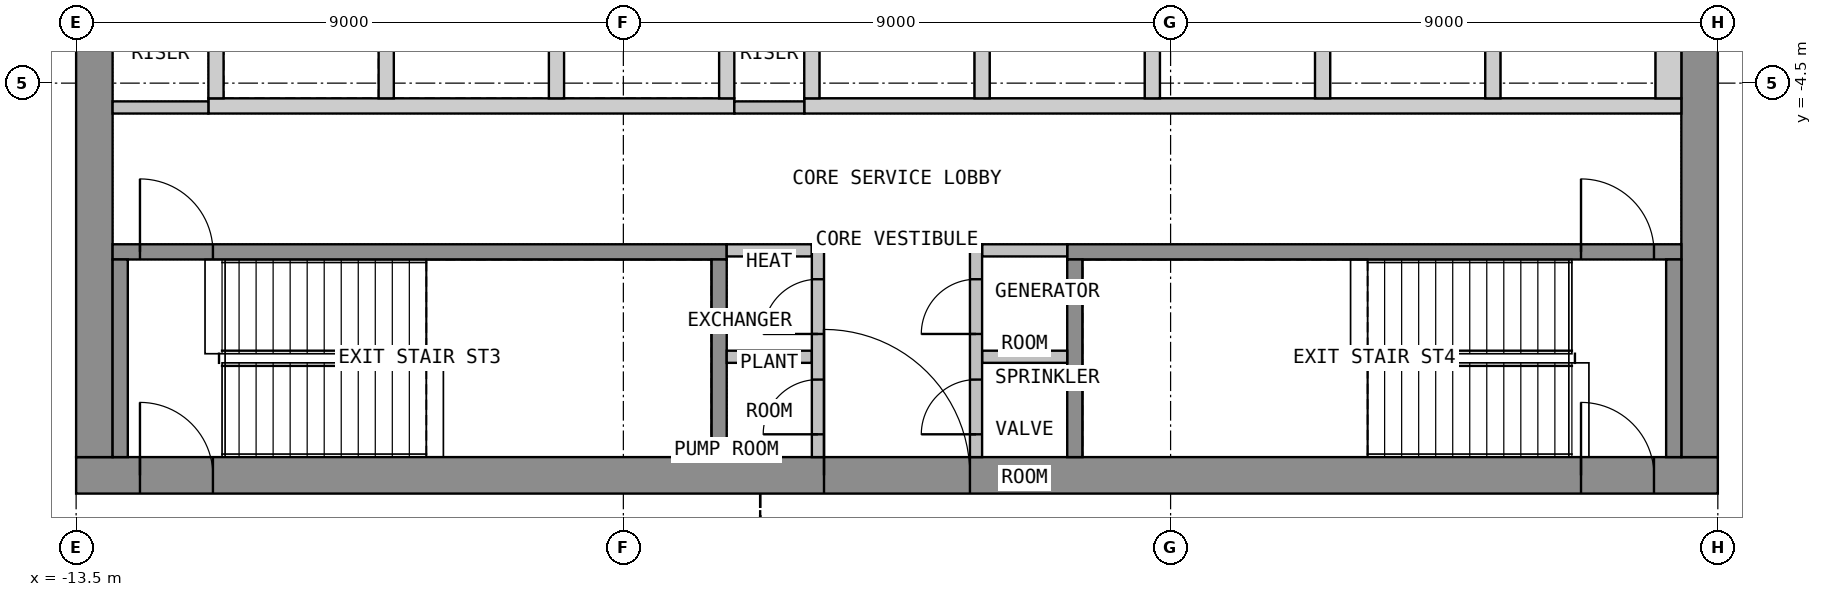
"""IFC4 building model, lengths in metres.
Left out: names, types, materials, properties, quantities, classifications, styles, units other than length and angle.
Written with IfcOpenShell. Run it as: python <this file> out.ifc"""

import sys

from ifc_helpers import new_model, si_unit, direction, frame, frame_2d, origin, place, context, subcontext, project, spatial, polyline, rectangle, outline, extrude, element, fill, save


model = new_model("IFC4")
c1 = context("Model", 3, precision=1e-05, world=origin(), true_north=direction((0.0, 1.0)))
c2 = subcontext(c1, "Body", "Model", "MODEL_VIEW")
j1 = project(units=[si_unit("LENGTHUNIT", "METRE"), si_unit("PLANEANGLEUNIT", "RADIAN")], contexts=[c1])
p1 = place(None, origin())
s1 = spatial("IfcSite", under=j1, at=p1, CompositionType="ELEMENT")
p2 = place(p1, origin())
s2 = spatial("IfcBuilding", under=s1, at=p2, CompositionType="ELEMENT")
p3 = place(p2, frame((0.0, 0.0, 230.7)))
s3 = spatial("IfcBuildingStorey", under=s2, at=p3, CompositionType="ELEMENT", Elevation=230.7)
p4 = place(p3, frame((-13.5, -10.95, 0.0), z_axis=(0.0, 0.0, 1.0), x_axis=(1.0, 0.0, 0.0)))
e1 = element("IfcWall", 1, at=p4, inside=s3, PredefinedType="SHEAR", context=c2, shape_type="SweptSolid", body=[
    extrude(rectangle(XDim=27.0, YDim=0.6, at=frame_2d((13.5, 0.0))), origin(), (0.0, 0.0, 1.0), 4.175),
])
p5 = place(p4, frame((12.3, 0.0, 0.0)))
e2 = element("IfcOpeningElement", 2, at=p5, cuts=e1, PredefinedType="OPENING", context=c2, shape_type="SweptSolid", body=[
    extrude(rectangle(XDim=2.4, YDim=2.1, at=frame_2d((1.2, 1.05))), frame((0.0, 0.31, 0.0), z_axis=(0.0, -1.0, 0.0), x_axis=(1.0, 0.0, 0.0)), (0.0, 0.0, 1.0), 0.62),
])
p6 = place(p4, frame((1.05, 0.0, 0.0)))
e3 = element("IfcOpeningElement", 3, at=p6, cuts=e1, PredefinedType="OPENING", context=c2, shape_type="SweptSolid", body=[
    extrude(rectangle(XDim=1.2, YDim=2.1, at=frame_2d((0.6, 1.05))), frame((0.0, 0.31, 0.0), z_axis=(0.0, -1.0, 0.0), x_axis=(1.0, 0.0, 0.0)), (0.0, 0.0, 1.0), 0.62),
])
p7 = place(p4, frame((24.75, 0.0, 0.0)))
e4 = element("IfcOpeningElement", 4, at=p7, cuts=e1, PredefinedType="OPENING", context=c2, shape_type="SweptSolid", body=[
    extrude(rectangle(XDim=1.2, YDim=2.1, at=frame_2d((0.6, 1.05))), frame((0.0, 0.31, 0.0), z_axis=(0.0, -1.0, 0.0), x_axis=(1.0, 0.0, 0.0)), (0.0, 0.0, 1.0), 0.62),
])
p8 = place(p3, frame((-13.2, -10.65, 0.0), z_axis=(0.0, 0.0, 1.0), x_axis=(0.0, 1.0, 0.0)))
e5 = element("IfcWall", 5, at=p8, inside=s3, PredefinedType="SHEAR", context=c2, shape_type="SweptSolid", body=[
    extrude(rectangle(XDim=21.3, YDim=0.6, at=frame_2d((10.65, 0.0))), origin(), (0.0, 0.0, 1.0), 4.175),
])
p9 = place(p8, frame((9.45, 0.0, 0.0)))
e6 = element("IfcOpeningElement", 6, at=p9, cuts=e5, PredefinedType="OPENING", context=c2, shape_type="SweptSolid", body=[
    extrude(rectangle(XDim=2.4, YDim=2.1, at=frame_2d((1.2, 1.05))), frame((0.0, 0.31, 0.0), z_axis=(0.0, -1.0, 0.0), x_axis=(1.0, 0.0, 0.0)), (0.0, 0.0, 1.0), 0.62),
])
p10 = place(p3, frame((13.2, -10.65, 0.0), z_axis=(0.0, 0.0, 1.0), x_axis=(0.0, 1.0, 0.0)))
e7 = element("IfcWall", 7, at=p10, inside=s3, PredefinedType="SHEAR", context=c2, shape_type="SweptSolid", body=[
    extrude(rectangle(XDim=21.3, YDim=0.6, at=frame_2d((10.65, 0.0))), origin(), (0.0, 0.0, 1.0), 4.175),
])
p11 = place(p10, frame((9.45, 0.0, 0.0)))
e8 = element("IfcOpeningElement", 8, at=p11, cuts=e7, PredefinedType="OPENING", context=c2, shape_type="SweptSolid", body=[
    extrude(rectangle(XDim=2.4, YDim=2.1, at=frame_2d((1.2, 1.05))), frame((0.0, 0.31, 0.0), z_axis=(0.0, -1.0, 0.0), x_axis=(1.0, 0.0, 0.0)), (0.0, 0.0, 1.0), 0.62),
])
p12 = place(p3, origin())
e9 = element("IfcWall", 9, at=p12, inside=s3, PredefinedType="SHEAR", context=c2, shape_type="SweptSolid", body=[
    extrude(outline(polyline([(-11.325, -5.0), (-2.675, -5.0), (-2.675, -4.75), (-11.325, -4.75), (-11.325, -5.0)])), origin(), (0.0, 0.0, 1.0), 4.175),
])
p13 = place(p3, origin())
e10 = element("IfcWall", 10, at=p13, inside=s3, PredefinedType="SHEAR", context=c2, shape_type="SweptSolid", body=[
    extrude(outline(polyline([(-1.525, -5.0), (12.9, -5.0), (12.9, -4.75), (-1.525, -4.75), (-1.525, -5.0)])), origin(), (0.0, 0.0, 1.0), 4.175),
])
p14 = place(p3, origin())
e11 = element("IfcWall", 11, at=p14, inside=s3, PredefinedType="SHEAR", context=c2, shape_type="SweptSolid", body=[
    extrude(outline(polyline([(-11.325, -4.75), (-11.075, -4.75), (-11.075, -2.05), (-11.325, -2.05), (-11.325, -4.75)])), origin(), (0.0, 0.0, 1.0), 4.175),
])
p15 = place(p3, origin())
e12 = element("IfcWall", 12, at=p15, inside=s3, PredefinedType="SHEAR", context=c2, shape_type="SweptSolid", body=[
    extrude(outline(polyline([(-8.525, -4.75), (-8.275, -4.75), (-8.275, -2.05), (-8.525, -2.05), (-8.525, -4.75)])), origin(), (0.0, 0.0, 1.0), 4.175),
])
p16 = place(p3, origin())
e13 = element("IfcWall", 13, at=p16, inside=s3, PredefinedType="SHEAR", context=c2, shape_type="SweptSolid", body=[
    extrude(outline(polyline([(-5.725, -4.75), (-5.475, -4.75), (-5.475, -2.05), (-5.725, -2.05), (-5.725, -4.75)])), origin(), (0.0, 0.0, 1.0), 4.175),
])
p17 = place(p3, origin())
e14 = element("IfcWall", 14, at=p17, inside=s3, PredefinedType="SHEAR", context=c2, shape_type="SweptSolid", body=[
    extrude(outline(polyline([(-2.925, -4.75), (-2.675, -4.75), (-2.675, -2.05), (-2.925, -2.05), (-2.925, -4.75)])), origin(), (0.0, 0.0, 1.0), 4.175),
])
p18 = place(p3, origin())
e15 = element("IfcWall", 15, at=p18, inside=s3, PredefinedType="SHEAR", context=c2, shape_type="SweptSolid", body=[
    extrude(outline(polyline([(-1.525, -4.75), (-1.275, -4.75), (-1.275, -2.05), (-1.525, -2.05), (-1.525, -4.75)])), origin(), (0.0, 0.0, 1.0), 4.175),
])
p19 = place(p3, origin())
e16 = element("IfcWall", 16, at=p19, inside=s3, PredefinedType="SHEAR", context=c2, shape_type="SweptSolid", body=[
    extrude(outline(polyline([(1.275, -4.75), (1.525, -4.75), (1.525, -2.05), (1.275, -2.05), (1.275, -4.75)])), origin(), (0.0, 0.0, 1.0), 4.175),
])
p20 = place(p3, origin())
e17 = element("IfcWall", 17, at=p20, inside=s3, PredefinedType="SHEAR", context=c2, shape_type="SweptSolid", body=[
    extrude(outline(polyline([(4.075, -4.75), (4.325, -4.75), (4.325, -2.05), (4.075, -2.05), (4.075, -4.75)])), origin(), (0.0, 0.0, 1.0), 4.175),
])
p21 = place(p3, origin())
e18 = element("IfcWall", 18, at=p21, inside=s3, PredefinedType="SHEAR", context=c2, shape_type="SweptSolid", body=[
    extrude(outline(polyline([(6.875, -4.75), (7.125, -4.75), (7.125, -2.05), (6.875, -2.05), (6.875, -4.75)])), origin(), (0.0, 0.0, 1.0), 4.175),
])
p22 = place(p3, origin())
e19 = element("IfcWall", 19, at=p22, inside=s3, PredefinedType="SHEAR", context=c2, shape_type="SweptSolid", body=[
    extrude(outline(polyline([(9.675, -4.75), (9.925, -4.75), (9.925, -2.05), (9.675, -2.05), (9.675, -4.75)])), origin(), (0.0, 0.0, 1.0), 4.175),
])
p23 = place(p3, origin())
e20 = element("IfcWall", 20, at=p23, inside=s3, PredefinedType="SHEAR", context=c2, shape_type="SweptSolid", body=[
    extrude(outline(polyline([(12.475, -4.75), (12.9, -4.75), (12.9, -2.05), (12.475, -2.05), (12.475, -4.75)])), origin(), (0.0, 0.0, 1.0), 4.175),
])
p24 = place(p3, frame((-12.9, -7.275, 0.0), z_axis=(0.0, 0.0, 1.0), x_axis=(1.0, 0.0, 0.0)))
e21 = element("IfcWall", 21, at=p24, inside=s3, PredefinedType="SHEAR", context=c2, shape_type="SweptSolid", body=[
    extrude(rectangle(XDim=10.1, YDim=0.25, at=frame_2d((5.05, 0.0))), origin(), (0.0, 0.0, 1.0), 4.175),
])
p25 = place(p24, frame((0.45, 0.0, 0.0)))
e22 = element("IfcOpeningElement", 22, at=p25, cuts=e21, PredefinedType="OPENING", context=c2, shape_type="SweptSolid", body=[
    extrude(rectangle(XDim=1.2, YDim=2.1, at=frame_2d((0.6, 1.05))), frame((0.0, 0.135, 0.0), z_axis=(0.0, -1.0, 0.0), x_axis=(1.0, 0.0, 0.0)), (0.0, 0.0, 1.0), 0.27),
])
for number, where, z_axis, x_axis in (
    (23, (-12.775, -10.65, 0.0), (0.0, 0.0, 1.0), (0.0, 1.0, 0.0)),
    (24, (-2.925, -10.65, 0.0), (0.0, 0.0, 1.0), (0.0, 1.0, 0.0)),
):
    element("IfcWall", number, at=place(p3, frame(where, z_axis=z_axis, x_axis=x_axis)), inside=s3, PredefinedType="SHEAR", context=c2, shape_type="SweptSolid", body=[
        extrude(rectangle(XDim=3.25, YDim=0.25, at=frame_2d((1.625, 0.0))), origin(), (0.0, 0.0, 1.0), 4.175),
    ])
p26 = place(p3, frame((2.8, -7.275, 0.0), z_axis=(0.0, 0.0, 1.0), x_axis=(1.0, 0.0, 0.0)))
e25 = element("IfcWall", 25, at=p26, inside=s3, PredefinedType="SHEAR", context=c2, shape_type="SweptSolid", body=[
    extrude(rectangle(XDim=10.1, YDim=0.25, at=frame_2d((5.05, 0.0))), origin(), (0.0, 0.0, 1.0), 4.175),
])
p27 = place(p26, frame((8.45, 0.0, 0.0)))
e26 = element("IfcOpeningElement", 26, at=p27, cuts=e25, PredefinedType="OPENING", context=c2, shape_type="SweptSolid", body=[
    extrude(rectangle(XDim=1.2, YDim=2.1, at=frame_2d((0.6, 1.05))), frame((0.0, 0.135, 0.0), z_axis=(0.0, -1.0, 0.0), x_axis=(1.0, 0.0, 0.0)), (0.0, 0.0, 1.0), 0.27),
])
for number, where, z_axis, x_axis in (
    (27, (2.925, -10.65, 0.0), (0.0, 0.0, 1.0), (0.0, 1.0, 0.0)),
    (28, (12.775, -10.65, 0.0), (0.0, 0.0, 1.0), (0.0, 1.0, 0.0)),
):
    element("IfcWall", number, at=place(p3, frame(where, z_axis=z_axis, x_axis=x_axis)), inside=s3, PredefinedType="SHEAR", context=c2, shape_type="SweptSolid", body=[
        extrude(rectangle(XDim=3.25, YDim=0.25, at=frame_2d((1.625, 0.0))), origin(), (0.0, 0.0, 1.0), 4.175),
    ])
for number, where, z_axis, x_axis in (
    (29, (-2.8, -7.25, 0.0), (0.0, 0.0, 1.0), (1.0, 0.0, 0.0)),
    (30, (-2.8, -9.0, 0.0), (0.0, 0.0, 1.0), (1.0, 0.0, 0.0)),
    (31, (1.4, -7.25, 0.0), (0.0, 0.0, 1.0), (1.0, 0.0, 0.0)),
    (32, (1.4, -9.0, 0.0), (0.0, 0.0, 1.0), (1.0, 0.0, 0.0)),
):
    element("IfcWall", number, at=place(p3, frame(where, z_axis=z_axis, x_axis=x_axis)), inside=s3, PredefinedType="PARTITIONING", context=c2, shape_type="SweptSolid", body=[
        extrude(rectangle(XDim=1.4, YDim=0.2, at=frame_2d((0.7, 0.0))), origin(), (0.0, 0.0, 1.0), 4.175),
    ])
p28 = place(p3, frame((-1.3, -10.65, 0.0), z_axis=(0.0, 0.0, 1.0), x_axis=(0.0, 1.0, 0.0)))
e33 = element("IfcWall", 33, at=p28, inside=s3, PredefinedType="PARTITIONING", context=c2, shape_type="SweptSolid", body=[
    extrude(rectangle(XDim=3.5, YDim=0.2, at=frame_2d((1.75, 0.0))), origin(), (0.0, 0.0, 1.0), 4.175),
])
p29 = place(p28, frame((0.375, 0.0, 0.0)))
e34 = element("IfcOpeningElement", 34, at=p29, cuts=e33, PredefinedType="OPENING", context=c2, shape_type="SweptSolid", body=[
    extrude(rectangle(XDim=0.9, YDim=2.1, at=frame_2d((0.45, 1.05))), frame((0.0, 0.11, 0.0), z_axis=(0.0, -1.0, 0.0), x_axis=(1.0, 0.0, 0.0)), (0.0, 0.0, 1.0), 0.22),
])
p30 = place(p28, frame((2.025, 0.0, 0.0)))
e35 = element("IfcOpeningElement", 35, at=p30, cuts=e33, PredefinedType="OPENING", context=c2, shape_type="SweptSolid", body=[
    extrude(rectangle(XDim=0.9, YDim=2.1, at=frame_2d((0.45, 1.05))), frame((0.0, 0.11, 0.0), z_axis=(0.0, -1.0, 0.0), x_axis=(1.0, 0.0, 0.0)), (0.0, 0.0, 1.0), 0.22),
])
p31 = place(p3, frame((1.3, -10.65, 0.0), z_axis=(0.0, 0.0, 1.0), x_axis=(0.0, 1.0, 0.0)))
e36 = element("IfcWall", 36, at=p31, inside=s3, PredefinedType="PARTITIONING", context=c2, shape_type="SweptSolid", body=[
    extrude(rectangle(XDim=3.5, YDim=0.2, at=frame_2d((1.75, 0.0))), origin(), (0.0, 0.0, 1.0), 4.175),
])
p32 = place(p31, frame((0.375, 0.0, 0.0)))
e37 = element("IfcOpeningElement", 37, at=p32, cuts=e36, PredefinedType="OPENING", context=c2, shape_type="SweptSolid", body=[
    extrude(rectangle(XDim=0.9, YDim=2.1, at=frame_2d((0.45, 1.05))), frame((0.0, 0.11, 0.0), z_axis=(0.0, -1.0, 0.0), x_axis=(1.0, 0.0, 0.0)), (0.0, 0.0, 1.0), 0.22),
])
p33 = place(p31, frame((2.025, 0.0, 0.0)))
e38 = element("IfcOpeningElement", 38, at=p33, cuts=e36, PredefinedType="OPENING", context=c2, shape_type="SweptSolid", body=[
    extrude(rectangle(XDim=0.9, YDim=2.1, at=frame_2d((0.45, 1.05))), frame((0.0, 0.11, 0.0), z_axis=(0.0, -1.0, 0.0), x_axis=(1.0, 0.0, 0.0)), (0.0, 0.0, 1.0), 0.22),
])
p34 = place(p3, frame((-12.9, -4.9, 0.0), z_axis=(0.0, 0.0, 1.0), x_axis=(1.0, 0.0, 0.0)))
e39 = element("IfcWall", 39, at=p34, inside=s3, PredefinedType="PARTITIONING", context=c2, shape_type="SweptSolid", body=[
    extrude(rectangle(XDim=1.575, YDim=0.2, at=frame_2d((0.788, 0.0))), origin(), (0.0, 0.0, 1.0), 4.175),
])
p35 = place(p3, frame((-2.675, -4.9, 0.0), z_axis=(0.0, 0.0, 1.0), x_axis=(1.0, 0.0, 0.0)))
e40 = element("IfcWall", 40, at=p35, inside=s3, PredefinedType="PARTITIONING", context=c2, shape_type="SweptSolid", body=[
    extrude(rectangle(XDim=1.15, YDim=0.2, at=frame_2d((0.575, 0.0))), origin(), (0.0, 0.0, 1.0), 4.175),
])
p36 = place(p5, origin())
e41 = element("IfcDoor", 41, at=p36, inside=s3, OperationType="DOUBLE_DOOR_DOUBLE_SWING", PredefinedType="DOOR", context=c2, shape_type="SweptSolid", body=[
    extrude(rectangle(XDim=2.4, YDim=2.1, at=frame_2d((1.2, 1.05))), frame((0.0, 0.025, 0.0), z_axis=(0.0, -1.0, 0.0), x_axis=(1.0, 0.0, 0.0)), (0.0, 0.0, 1.0), 0.05),
])
fill(e2, e41)
p37 = place(p6, origin())
e42 = element("IfcDoor", 42, at=p37, inside=s3, OperationType="SINGLE_SWING_RIGHT", PredefinedType="DOOR", context=c2, shape_type="SweptSolid", body=[
    extrude(rectangle(XDim=1.2, YDim=2.1, at=frame_2d((0.6, 1.05))), frame((0.0, 0.025, 0.0), z_axis=(0.0, -1.0, 0.0), x_axis=(1.0, 0.0, 0.0)), (0.0, 0.0, 1.0), 0.05),
])
fill(e3, e42)
p38 = place(p7, origin())
e43 = element("IfcDoor", 43, at=p38, inside=s3, OperationType="SINGLE_SWING_RIGHT", PredefinedType="DOOR", context=c2, shape_type="SweptSolid", body=[
    extrude(rectangle(XDim=1.2, YDim=2.1, at=frame_2d((0.6, 1.05))), frame((0.0, 0.025, 0.0), z_axis=(0.0, -1.0, 0.0), x_axis=(1.0, 0.0, 0.0)), (0.0, 0.0, 1.0), 0.05),
])
fill(e4, e43)
p39 = place(p25, origin())
e44 = element("IfcDoor", 44, at=p39, inside=s3, OperationType="SINGLE_SWING_LEFT", PredefinedType="DOOR", context=c2, shape_type="SweptSolid", body=[
    extrude(rectangle(XDim=1.2, YDim=2.1, at=frame_2d((0.6, 1.05))), frame((0.0, 0.025, 0.0), z_axis=(0.0, -1.0, 0.0), x_axis=(1.0, 0.0, 0.0)), (0.0, 0.0, 1.0), 0.05),
])
fill(e22, e44)
p40 = place(p27, origin())
e45 = element("IfcDoor", 45, at=p40, inside=s3, OperationType="SINGLE_SWING_LEFT", PredefinedType="DOOR", context=c2, shape_type="SweptSolid", body=[
    extrude(rectangle(XDim=1.2, YDim=2.1, at=frame_2d((0.6, 1.05))), frame((0.0, 0.025, 0.0), z_axis=(0.0, -1.0, 0.0), x_axis=(1.0, 0.0, 0.0)), (0.0, 0.0, 1.0), 0.05),
])
fill(e26, e45)
p41 = place(p29, origin())
e46 = element("IfcDoor", 46, at=p41, inside=s3, OperationType="SINGLE_SWING_LEFT", PredefinedType="DOOR", context=c2, shape_type="SweptSolid", body=[
    extrude(rectangle(XDim=0.9, YDim=2.1, at=frame_2d((0.45, 1.05))), frame((0.0, 0.025, 0.0), z_axis=(0.0, -1.0, 0.0), x_axis=(1.0, 0.0, 0.0)), (0.0, 0.0, 1.0), 0.05),
])
fill(e34, e46)
p42 = place(p30, origin())
e47 = element("IfcDoor", 47, at=p42, inside=s3, OperationType="SINGLE_SWING_LEFT", PredefinedType="DOOR", context=c2, shape_type="SweptSolid", body=[
    extrude(rectangle(XDim=0.9, YDim=2.1, at=frame_2d((0.45, 1.05))), frame((0.0, 0.025, 0.0), z_axis=(0.0, -1.0, 0.0), x_axis=(1.0, 0.0, 0.0)), (0.0, 0.0, 1.0), 0.05),
])
fill(e35, e47)
p43 = place(p32, origin())
e48 = element("IfcDoor", 48, at=p43, inside=s3, OperationType="SINGLE_SWING_LEFT", PredefinedType="DOOR", context=c2, shape_type="SweptSolid", body=[
    extrude(rectangle(XDim=0.9, YDim=2.1, at=frame_2d((0.45, 1.05))), frame((0.0, 0.025, 0.0), z_axis=(0.0, -1.0, 0.0), x_axis=(1.0, 0.0, 0.0)), (0.0, 0.0, 1.0), 0.05),
])
fill(e37, e48)
p44 = place(p33, origin())
e49 = element("IfcDoor", 49, at=p44, inside=s3, OperationType="SINGLE_SWING_LEFT", PredefinedType="DOOR", context=c2, shape_type="SweptSolid", body=[
    extrude(rectangle(XDim=0.9, YDim=2.1, at=frame_2d((0.45, 1.05))), frame((0.0, 0.025, 0.0), z_axis=(0.0, -1.0, 0.0), x_axis=(1.0, 0.0, 0.0)), (0.0, 0.0, 1.0), 0.05),
])
fill(e38, e49)
save(model, sys.argv[1])
